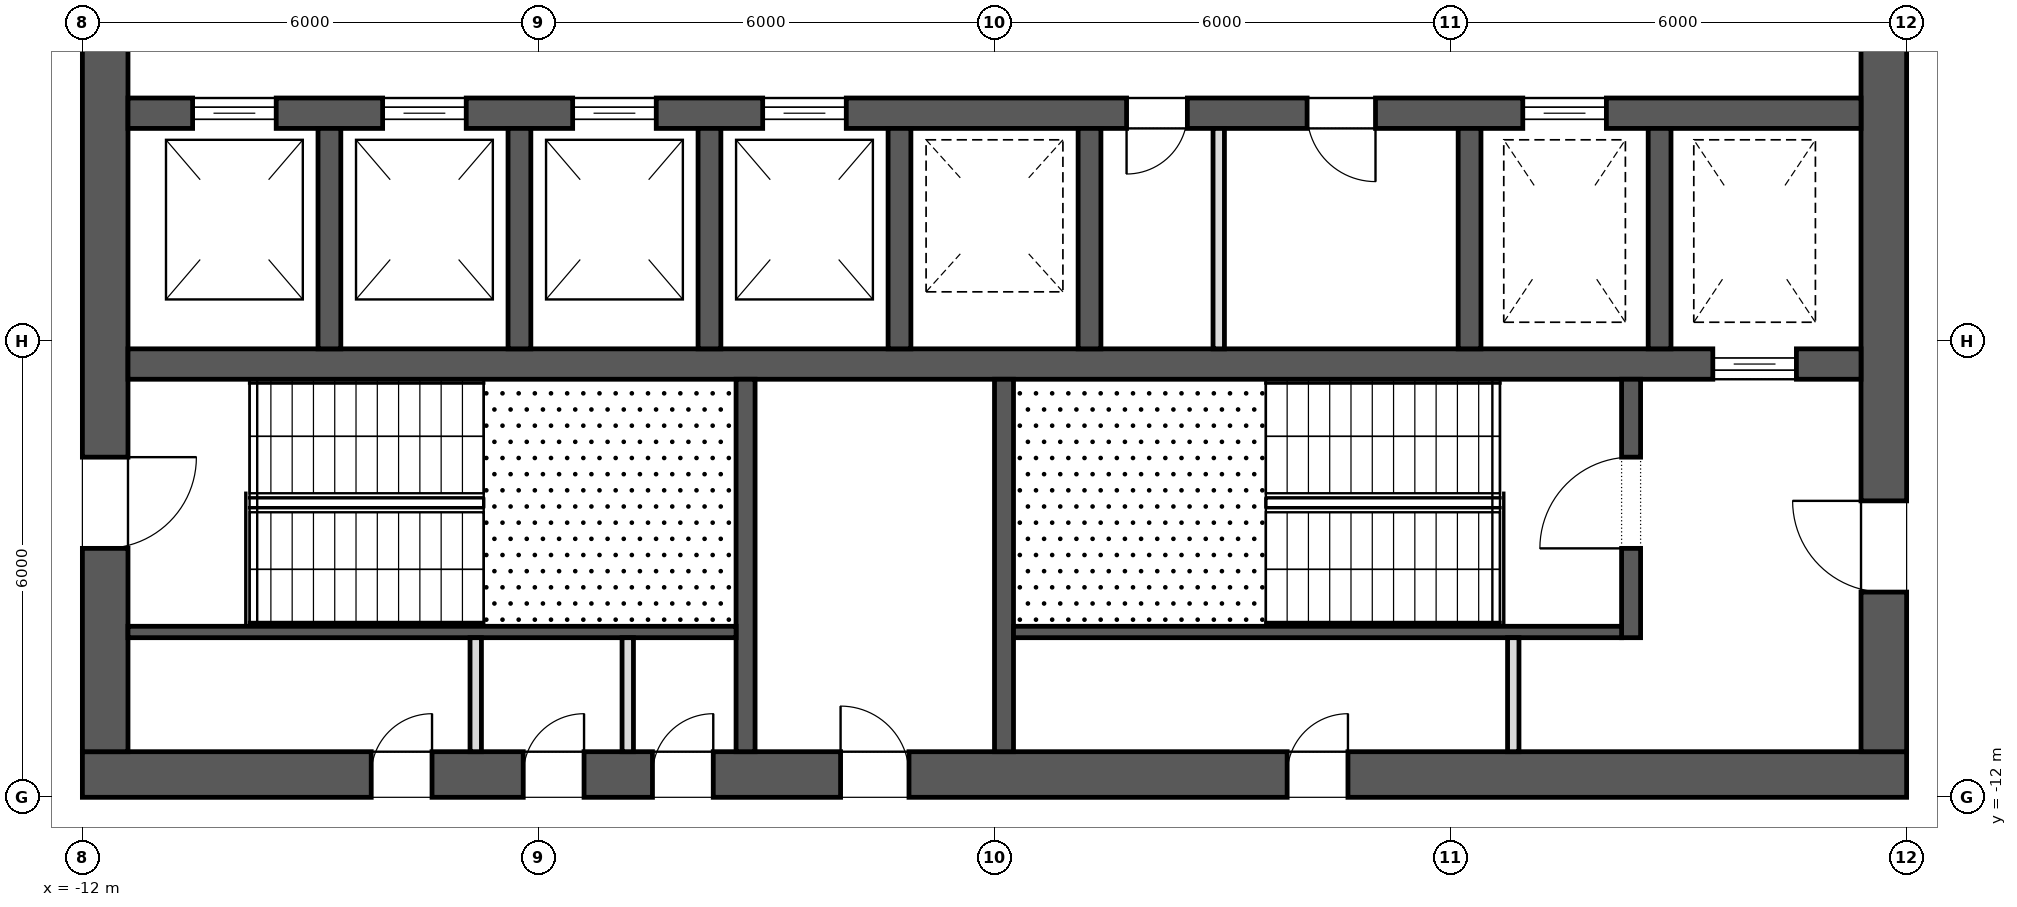
"""IFC4 building model, lengths in metres.
Left out: names, types, materials, properties, quantities, classifications, styles, units other than length and angle.
Written with IfcOpenShell. Run it as: python <this file> out.ifc"""

import sys

from ifc_helpers import new_model, si_unit, direction, frame, frame_2d, origin, place, context, subcontext, project, spatial, rectangle, extrude, element, fill, save


model = new_model("IFC4")
c1 = context("Model", 3, precision=1e-05, world=origin(), true_north=direction((0.0, 1.0)))
c2 = subcontext(c1, "Body", "Model", "MODEL_VIEW")
j1 = project(units=[si_unit("LENGTHUNIT", "METRE"), si_unit("PLANEANGLEUNIT", "RADIAN")], contexts=[c1])
p1 = place(None, origin())
s1 = spatial("IfcSite", under=j1, at=p1, CompositionType="ELEMENT")
p2 = place(p1, origin())
s2 = spatial("IfcBuilding", under=s1, at=p2, CompositionType="ELEMENT")
p3 = place(p2, frame((0.0, 0.0, 210.9)))
s3 = spatial("IfcBuildingStorey", under=s2, at=p3, CompositionType="ELEMENT", Elevation=210.9)
p4 = place(p3, frame((-12.0, -11.7, 0.0), z_axis=(0.0, 0.0, 1.0), x_axis=(1.0, 0.0, 0.0)))
e1 = element("IfcWall", 1, at=p4, inside=s3, PredefinedType="SHEAR", context=c2, shape_type="SweptSolid", body=[
    extrude(rectangle(XDim=24.0, YDim=0.6, at=frame_2d((12.0, 0.0))), origin(), (0.0, 0.0, 1.0), 4.0),
])
p5 = place(p4, frame((9.975, 0.0, 0.0)))
e2 = element("IfcOpeningElement", 2, at=p5, cuts=e1, PredefinedType="OPENING", context=c2, shape_type="SweptSolid", body=[
    extrude(rectangle(XDim=0.9, YDim=2.1, at=frame_2d((0.45, 1.05))), frame((0.0, 0.312, 0.0), z_axis=(0.0, -1.0, 0.0), x_axis=(1.0, 0.0, 0.0)), (0.0, 0.0, 1.0), 0.624),
])
p6 = place(p4, frame((3.8, 0.0, 0.0)))
e3 = element("IfcOpeningElement", 3, at=p6, cuts=e1, PredefinedType="OPENING", context=c2, shape_type="SweptSolid", body=[
    extrude(rectangle(XDim=0.8, YDim=2.1, at=frame_2d((0.4, 1.05))), frame((0.0, 0.312, 0.0), z_axis=(0.0, -1.0, 0.0), x_axis=(1.0, 0.0, 0.0)), (0.0, 0.0, 1.0), 0.624),
])
p7 = place(p4, frame((5.8, 0.0, 0.0)))
e4 = element("IfcOpeningElement", 4, at=p7, cuts=e1, PredefinedType="OPENING", context=c2, shape_type="SweptSolid", body=[
    extrude(rectangle(XDim=0.8, YDim=2.1, at=frame_2d((0.4, 1.05))), frame((0.0, 0.312, 0.0), z_axis=(0.0, -1.0, 0.0), x_axis=(1.0, 0.0, 0.0)), (0.0, 0.0, 1.0), 0.624),
])
p8 = place(p4, frame((7.5, 0.0, 0.0)))
e5 = element("IfcOpeningElement", 5, at=p8, cuts=e1, PredefinedType="OPENING", context=c2, shape_type="SweptSolid", body=[
    extrude(rectangle(XDim=0.8, YDim=2.1, at=frame_2d((0.4, 1.05))), frame((0.0, 0.312, 0.0), z_axis=(0.0, -1.0, 0.0), x_axis=(1.0, 0.0, 0.0)), (0.0, 0.0, 1.0), 0.624),
])
p9 = place(p4, frame((15.85, 0.0, 0.0)))
e6 = element("IfcOpeningElement", 6, at=p9, cuts=e1, PredefinedType="OPENING", context=c2, shape_type="SweptSolid", body=[
    extrude(rectangle(XDim=0.8, YDim=2.1, at=frame_2d((0.4, 1.05))), frame((0.0, 0.312, 0.0), z_axis=(0.0, -1.0, 0.0), x_axis=(1.0, 0.0, 0.0)), (0.0, 0.0, 1.0), 0.624),
])
p10 = place(p3, frame((11.7, -11.4, 0.0), z_axis=(0.0, 0.0, 1.0), x_axis=(0.0, 1.0, 0.0)))
e7 = element("IfcWall", 7, at=p10, inside=s3, PredefinedType="SHEAR", context=c2, shape_type="SweptSolid", body=[
    extrude(rectangle(XDim=22.8, YDim=0.6, at=frame_2d((11.4, 0.0))), origin(), (0.0, 0.0, 1.0), 4.0),
])
p11 = place(p10, frame((10.2, 0.0, 0.0)))
e8 = element("IfcOpeningElement", 8, at=p11, cuts=e7, PredefinedType="OPENING", context=c2, shape_type="SweptSolid", body=[
    extrude(rectangle(XDim=2.4, YDim=2.1, at=frame_2d((1.2, 1.05))), frame((0.0, 0.312, 0.0), z_axis=(0.0, -1.0, 0.0), x_axis=(1.0, 0.0, 0.0)), (0.0, 0.0, 1.0), 0.624),
])
p12 = place(p10, frame((19.5, 0.0, 0.0)))
e9 = element("IfcOpeningElement", 9, at=p12, cuts=e7, PredefinedType="OPENING", context=c2, shape_type="SweptSolid", body=[
    extrude(rectangle(XDim=1.2, YDim=2.1, at=frame_2d((0.6, 1.05))), frame((0.0, 0.312, 0.0), z_axis=(0.0, -1.0, 0.0), x_axis=(1.0, 0.0, 0.0)), (0.0, 0.0, 1.0), 0.624),
])
p13 = place(p10, frame((2.1, 0.0, 0.0)))
e10 = element("IfcOpeningElement", 10, at=p13, cuts=e7, PredefinedType="OPENING", context=c2, shape_type="SweptSolid", body=[
    extrude(rectangle(XDim=1.2, YDim=2.1, at=frame_2d((0.6, 1.05))), frame((0.0, 0.312, 0.0), z_axis=(0.0, -1.0, 0.0), x_axis=(1.0, 0.0, 0.0)), (0.0, 0.0, 1.0), 0.624),
])
p14 = place(p3, frame((-11.7, -11.4, 0.0), z_axis=(0.0, 0.0, 1.0), x_axis=(0.0, 1.0, 0.0)))
e11 = element("IfcWall", 11, at=p14, inside=s3, PredefinedType="SHEAR", context=c2, shape_type="SweptSolid", body=[
    extrude(rectangle(XDim=22.8, YDim=0.6, at=frame_2d((11.4, 0.0))), origin(), (0.0, 0.0, 1.0), 4.0),
])
p15 = place(p14, frame((10.2, 0.0, 0.0)))
e12 = element("IfcOpeningElement", 12, at=p15, cuts=e11, PredefinedType="OPENING", context=c2, shape_type="SweptSolid", body=[
    extrude(rectangle(XDim=2.4, YDim=2.1, at=frame_2d((1.2, 1.05))), frame((0.0, 0.312, 0.0), z_axis=(0.0, -1.0, 0.0), x_axis=(1.0, 0.0, 0.0)), (0.0, 0.0, 1.0), 0.624),
])
p16 = place(p14, frame((18.925, 0.0, 0.0)))
e13 = element("IfcOpeningElement", 13, at=p16, cuts=e11, PredefinedType="OPENING", context=c2, shape_type="SweptSolid", body=[
    extrude(rectangle(XDim=1.2, YDim=2.1, at=frame_2d((0.6, 1.05))), frame((0.0, 0.312, 0.0), z_axis=(0.0, -1.0, 0.0), x_axis=(1.0, 0.0, 0.0)), (0.0, 0.0, 1.0), 0.624),
])
p17 = place(p14, frame((2.675, 0.0, 0.0)))
e14 = element("IfcOpeningElement", 14, at=p17, cuts=e11, PredefinedType="OPENING", context=c2, shape_type="SweptSolid", body=[
    extrude(rectangle(XDim=1.2, YDim=2.1, at=frame_2d((0.6, 1.05))), frame((0.0, 0.312, 0.0), z_axis=(0.0, -1.0, 0.0), x_axis=(1.0, 0.0, 0.0)), (0.0, 0.0, 1.0), 0.624),
])
p18 = place(p3, frame((-11.4, -3.0, 0.0), z_axis=(0.0, 0.0, 1.0), x_axis=(1.0, 0.0, 0.0)))
e15 = element("IfcWall", 15, at=p18, inside=s3, PredefinedType="SHEAR", context=c2, shape_type="SweptSolid", body=[
    extrude(rectangle(XDim=22.8, YDim=0.4, at=frame_2d((11.4, 0.0))), origin(), (0.0, 0.0, 1.0), 4.0),
])
p19 = place(p18, frame((0.85, 0.0, 0.0)))
e16 = element("IfcOpeningElement", 16, at=p19, cuts=e15, PredefinedType="OPENING", context=c2, shape_type="SweptSolid", body=[
    extrude(rectangle(XDim=1.1, YDim=2.1, at=frame_2d((0.55, 1.05))), frame((0.0, 0.212, 0.0), z_axis=(0.0, -1.0, 0.0), x_axis=(1.0, 0.0, 0.0)), (0.0, 0.0, 1.0), 0.424),
])
p20 = place(p18, frame((3.35, 0.0, 0.0)))
e17 = element("IfcOpeningElement", 17, at=p20, cuts=e15, PredefinedType="OPENING", context=c2, shape_type="SweptSolid", body=[
    extrude(rectangle(XDim=1.1, YDim=2.1, at=frame_2d((0.55, 1.05))), frame((0.0, 0.212, 0.0), z_axis=(0.0, -1.0, 0.0), x_axis=(1.0, 0.0, 0.0)), (0.0, 0.0, 1.0), 0.424),
])
p21 = place(p18, frame((5.85, 0.0, 0.0)))
e18 = element("IfcOpeningElement", 18, at=p21, cuts=e15, PredefinedType="OPENING", context=c2, shape_type="SweptSolid", body=[
    extrude(rectangle(XDim=1.1, YDim=2.1, at=frame_2d((0.55, 1.05))), frame((0.0, 0.212, 0.0), z_axis=(0.0, -1.0, 0.0), x_axis=(1.0, 0.0, 0.0)), (0.0, 0.0, 1.0), 0.424),
])
p22 = place(p18, frame((8.35, 0.0, 0.0)))
e19 = element("IfcOpeningElement", 19, at=p22, cuts=e15, PredefinedType="OPENING", context=c2, shape_type="SweptSolid", body=[
    extrude(rectangle(XDim=1.1, YDim=2.1, at=frame_2d((0.55, 1.05))), frame((0.0, 0.212, 0.0), z_axis=(0.0, -1.0, 0.0), x_axis=(1.0, 0.0, 0.0)), (0.0, 0.0, 1.0), 0.424),
])
p23 = place(p18, frame((18.35, 0.0, 0.0)))
e20 = element("IfcOpeningElement", 20, at=p23, cuts=e15, PredefinedType="OPENING", context=c2, shape_type="SweptSolid", body=[
    extrude(rectangle(XDim=1.1, YDim=2.1, at=frame_2d((0.55, 1.05))), frame((0.0, 0.212, 0.0), z_axis=(0.0, -1.0, 0.0), x_axis=(1.0, 0.0, 0.0)), (0.0, 0.0, 1.0), 0.424),
])
p24 = place(p18, frame((13.137, 0.0, 0.0)))
e21 = element("IfcOpeningElement", 21, at=p24, cuts=e15, PredefinedType="OPENING", context=c2, shape_type="SweptSolid", body=[
    extrude(rectangle(XDim=0.8, YDim=2.1, at=frame_2d((0.4, 1.05))), frame((0.0, 0.212, 0.0), z_axis=(0.0, -1.0, 0.0), x_axis=(1.0, 0.0, 0.0)), (0.0, 0.0, 1.0), 0.424),
])
p25 = place(p18, frame((15.512, 0.0, 0.0)))
e22 = element("IfcOpeningElement", 22, at=p25, cuts=e15, PredefinedType="OPENING", context=c2, shape_type="SweptSolid", body=[
    extrude(rectangle(XDim=0.9, YDim=2.1, at=frame_2d((0.45, 1.05))), frame((0.0, 0.212, 0.0), z_axis=(0.0, -1.0, 0.0), x_axis=(1.0, 0.0, 0.0)), (0.0, 0.0, 1.0), 0.424),
])
p26 = place(p3, frame((-11.4, -6.3, 0.0), z_axis=(0.0, 0.0, 1.0), x_axis=(1.0, 0.0, 0.0)))
e23 = element("IfcWall", 23, at=p26, inside=s3, PredefinedType="SHEAR", context=c2, shape_type="SweptSolid", body=[
    extrude(rectangle(XDim=22.8, YDim=0.4, at=frame_2d((11.4, 0.0))), origin(), (0.0, 0.0, 1.0), 4.0),
])
p27 = place(p26, frame((20.85, 0.0, 0.0)))
e24 = element("IfcOpeningElement", 24, at=p27, cuts=e23, PredefinedType="OPENING", context=c2, shape_type="SweptSolid", body=[
    extrude(rectangle(XDim=1.1, YDim=2.1, at=frame_2d((0.55, 1.05))), frame((0.0, 0.212, 0.0), z_axis=(0.0, -1.0, 0.0), x_axis=(1.0, 0.0, 0.0)), (0.0, 0.0, 1.0), 0.424),
])
for number, where, z_axis, x_axis in (
    (25, (-8.75, -6.1, 0.0), (0.0, 0.0, 1.0), (0.0, 1.0, 0.0)),
    (26, (-6.25, -6.1, 0.0), (0.0, 0.0, 1.0), (0.0, 1.0, 0.0)),
    (27, (-3.75, -6.1, 0.0), (0.0, 0.0, 1.0), (0.0, 1.0, 0.0)),
    (28, (-1.25, -6.1, 0.0), (0.0, 0.0, 1.0), (0.0, 1.0, 0.0)),
    (29, (1.25, -6.1, 0.0), (0.0, 0.0, 1.0), (0.0, 1.0, 0.0)),
    (30, (6.25, -6.1, 0.0), (0.0, 0.0, 1.0), (0.0, 1.0, 0.0)),
    (31, (8.75, -6.1, 0.0), (0.0, 0.0, 1.0), (0.0, 1.0, 0.0)),
):
    element("IfcWall", number, at=place(p3, frame(where, z_axis=z_axis, x_axis=x_axis)), inside=s3, PredefinedType="SHEAR", context=c2, shape_type="SweptSolid", body=[
        extrude(rectangle(XDim=2.9, YDim=0.3, at=frame_2d((1.45, 0.0))), origin(), (0.0, 0.0, 1.0), 4.0),
    ])
for number, where, z_axis, x_axis in (
    (32, (-3.275, -11.4, 0.0), (0.0, 0.0, 1.0), (0.0, 1.0, 0.0)),
    (33, (0.125, -11.4, 0.0), (0.0, 0.0, 1.0), (0.0, 1.0, 0.0)),
):
    element("IfcWall", number, at=place(p3, frame(where, z_axis=z_axis, x_axis=x_axis)), inside=s3, PredefinedType="SHEAR", context=c2, shape_type="SweptSolid", body=[
        extrude(rectangle(XDim=4.9, YDim=0.25, at=frame_2d((2.45, 0.0))), origin(), (0.0, 0.0, 1.0), 3.7),
    ])
p28 = place(p3, frame((8.375, -9.9, 0.0), z_axis=(0.0, 0.0, 1.0), x_axis=(0.0, 1.0, 0.0)))
e34 = element("IfcWall", 34, at=p28, inside=s3, PredefinedType="SHEAR", context=c2, shape_type="SweptSolid", body=[
    extrude(rectangle(XDim=3.4, YDim=0.25, at=frame_2d((1.7, 0.0))), origin(), (0.0, 0.0, 1.0), 3.7),
])
p29 = place(p28, frame((1.175, 0.0, 0.0)))
e35 = element("IfcOpeningElement", 35, at=p29, cuts=e34, PredefinedType="OPENING", context=c2, shape_type="SweptSolid", body=[
    extrude(rectangle(XDim=1.2, YDim=2.1, at=frame_2d((0.6, 1.05))), frame((0.0, 0.137, 0.0), z_axis=(0.0, -1.0, 0.0), x_axis=(1.0, 0.0, 0.0)), (0.0, 0.0, 1.0), 0.274),
])
for number, where, z_axis, x_axis in (
    (36, (-11.4, -9.825, 0.0), (0.0, 0.0, 1.0), (1.0, 0.0, 0.0)),
    (37, (0.25, -9.825, 0.0), (0.0, 0.0, 1.0), (1.0, 0.0, 0.0)),
):
    element("IfcWall", number, at=place(p3, frame(where, z_axis=z_axis, x_axis=x_axis)), inside=s3, PredefinedType="SHEAR", context=c2, shape_type="SweptSolid", body=[
        extrude(rectangle(XDim=8.0, YDim=0.15, at=frame_2d((4.0, 0.0))), origin(), (0.0, 0.0, 1.0), 3.7),
    ])
for number, where, z_axis, x_axis in (
    (38, (-6.825, -11.4, 0.0), (0.0, 0.0, 1.0), (0.0, 1.0, 0.0)),
    (39, (-4.825, -11.4, 0.0), (0.0, 0.0, 1.0), (0.0, 1.0, 0.0)),
    (40, (6.825, -11.4, 0.0), (0.0, 0.0, 1.0), (0.0, 1.0, 0.0)),
):
    element("IfcWall", number, at=place(p3, frame(where, z_axis=z_axis, x_axis=x_axis)), inside=s3, PredefinedType="PARTITIONING", context=c2, shape_type="SweptSolid", body=[
        extrude(rectangle(XDim=1.5, YDim=0.15, at=frame_2d((0.75, 0.0))), origin(), (0.0, 0.0, 1.0), 3.7),
    ])
p30 = place(p3, frame((2.95, -6.1, 0.0), z_axis=(0.0, 0.0, 1.0), x_axis=(0.0, 1.0, 0.0)))
e41 = element("IfcWall", 41, at=p30, inside=s3, PredefinedType="PARTITIONING", context=c2, shape_type="SweptSolid", body=[
    extrude(rectangle(XDim=2.9, YDim=0.15, at=frame_2d((1.45, 0.0))), origin(), (0.0, 0.0, 1.0), 3.7),
])
p31 = place(p27, origin())
e42 = element("IfcDoor", 42, at=p31, inside=s3, OperationType="SLIDING_TO_LEFT", PredefinedType="DOOR", context=c2, shape_type="SweptSolid", body=[
    extrude(rectangle(XDim=1.1, YDim=2.1, at=frame_2d((0.55, 1.05))), frame((0.0, 0.025, 0.0), z_axis=(0.0, -1.0, 0.0), x_axis=(1.0, 0.0, 0.0)), (0.0, 0.0, 1.0), 0.05),
])
fill(e24, e42)
p32 = place(p19, origin())
e43 = element("IfcDoor", 43, at=p32, inside=s3, OperationType="SLIDING_TO_LEFT", PredefinedType="DOOR", context=c2, shape_type="SweptSolid", body=[
    extrude(rectangle(XDim=1.1, YDim=2.1, at=frame_2d((0.55, 1.05))), frame((0.0, 0.025, 0.0), z_axis=(0.0, -1.0, 0.0), x_axis=(1.0, 0.0, 0.0)), (0.0, 0.0, 1.0), 0.05),
])
fill(e16, e43)
p33 = place(p20, origin())
e44 = element("IfcDoor", 44, at=p33, inside=s3, OperationType="SLIDING_TO_LEFT", PredefinedType="DOOR", context=c2, shape_type="SweptSolid", body=[
    extrude(rectangle(XDim=1.1, YDim=2.1, at=frame_2d((0.55, 1.05))), frame((0.0, 0.025, 0.0), z_axis=(0.0, -1.0, 0.0), x_axis=(1.0, 0.0, 0.0)), (0.0, 0.0, 1.0), 0.05),
])
fill(e17, e44)
p34 = place(p21, origin())
e45 = element("IfcDoor", 45, at=p34, inside=s3, OperationType="SLIDING_TO_LEFT", PredefinedType="DOOR", context=c2, shape_type="SweptSolid", body=[
    extrude(rectangle(XDim=1.1, YDim=2.1, at=frame_2d((0.55, 1.05))), frame((0.0, 0.025, 0.0), z_axis=(0.0, -1.0, 0.0), x_axis=(1.0, 0.0, 0.0)), (0.0, 0.0, 1.0), 0.05),
])
fill(e18, e45)
p35 = place(p22, origin())
e46 = element("IfcDoor", 46, at=p35, inside=s3, OperationType="SLIDING_TO_LEFT", PredefinedType="DOOR", context=c2, shape_type="SweptSolid", body=[
    extrude(rectangle(XDim=1.1, YDim=2.1, at=frame_2d((0.55, 1.05))), frame((0.0, 0.025, 0.0), z_axis=(0.0, -1.0, 0.0), x_axis=(1.0, 0.0, 0.0)), (0.0, 0.0, 1.0), 0.05),
])
fill(e19, e46)
p36 = place(p23, origin())
e47 = element("IfcDoor", 47, at=p36, inside=s3, OperationType="SLIDING_TO_LEFT", PredefinedType="DOOR", context=c2, shape_type="SweptSolid", body=[
    extrude(rectangle(XDim=1.1, YDim=2.1, at=frame_2d((0.55, 1.05))), frame((0.0, 0.025, 0.0), z_axis=(0.0, -1.0, 0.0), x_axis=(1.0, 0.0, 0.0)), (0.0, 0.0, 1.0), 0.05),
])
fill(e20, e47)
p37 = place(p17, frame((1.2, 0.0, 0.0), z_axis=(0.0, 0.0, 1.0), x_axis=(-1.0, 0.0, 0.0)))
e48 = element("IfcDoor", 48, at=p37, inside=s3, OperationType="SINGLE_SWING_RIGHT", PredefinedType="DOOR", context=c2, shape_type="SweptSolid", body=[
    extrude(rectangle(XDim=1.2, YDim=2.1, at=frame_2d((0.6, 1.05))), frame((0.0, 0.025, 0.0), z_axis=(0.0, -1.0, 0.0), x_axis=(1.0, 0.0, 0.0)), (0.0, 0.0, 1.0), 0.05),
])
fill(e14, e48)
p38 = place(p29, origin())
e49 = element("IfcDoor", 49, at=p38, inside=s3, OperationType="SINGLE_SWING_RIGHT", PredefinedType="DOOR", context=c2, shape_type="SweptSolid", body=[
    extrude(rectangle(XDim=1.2, YDim=2.1, at=frame_2d((0.6, 1.05))), frame((0.0, 0.025, 0.0), z_axis=(0.0, -1.0, 0.0), x_axis=(1.0, 0.0, 0.0)), (0.0, 0.0, 1.0), 0.05),
])
fill(e35, e49)
p39 = place(p13, origin())
e50 = element("IfcDoor", 50, at=p39, inside=s3, OperationType="SINGLE_SWING_LEFT", PredefinedType="DOOR", context=c2, shape_type="SweptSolid", body=[
    extrude(rectangle(XDim=1.2, YDim=2.1, at=frame_2d((0.6, 1.05))), frame((0.0, 0.025, 0.0), z_axis=(0.0, -1.0, 0.0), x_axis=(1.0, 0.0, 0.0)), (0.0, 0.0, 1.0), 0.05),
])
fill(e10, e50)
p40 = place(p5, origin())
e51 = element("IfcDoor", 51, at=p40, inside=s3, OperationType="SINGLE_SWING_RIGHT", PredefinedType="DOOR", context=c2, shape_type="SweptSolid", body=[
    extrude(rectangle(XDim=0.9, YDim=2.1, at=frame_2d((0.45, 1.05))), frame((0.0, 0.025, 0.0), z_axis=(0.0, -1.0, 0.0), x_axis=(1.0, 0.0, 0.0)), (0.0, 0.0, 1.0), 0.05),
])
fill(e2, e51)
p41 = place(p6, origin())
e52 = element("IfcDoor", 52, at=p41, inside=s3, OperationType="SINGLE_SWING_LEFT", PredefinedType="DOOR", context=c2, shape_type="SweptSolid", body=[
    extrude(rectangle(XDim=0.8, YDim=2.1, at=frame_2d((0.4, 1.05))), frame((0.0, 0.025, 0.0), z_axis=(0.0, -1.0, 0.0), x_axis=(1.0, 0.0, 0.0)), (0.0, 0.0, 1.0), 0.05),
])
fill(e3, e52)
p42 = place(p7, origin())
e53 = element("IfcDoor", 53, at=p42, inside=s3, OperationType="SINGLE_SWING_LEFT", PredefinedType="DOOR", context=c2, shape_type="SweptSolid", body=[
    extrude(rectangle(XDim=0.8, YDim=2.1, at=frame_2d((0.4, 1.05))), frame((0.0, 0.025, 0.0), z_axis=(0.0, -1.0, 0.0), x_axis=(1.0, 0.0, 0.0)), (0.0, 0.0, 1.0), 0.05),
])
fill(e4, e53)
p43 = place(p8, origin())
e54 = element("IfcDoor", 54, at=p43, inside=s3, OperationType="SINGLE_SWING_LEFT", PredefinedType="DOOR", context=c2, shape_type="SweptSolid", body=[
    extrude(rectangle(XDim=0.8, YDim=2.1, at=frame_2d((0.4, 1.05))), frame((0.0, 0.025, 0.0), z_axis=(0.0, -1.0, 0.0), x_axis=(1.0, 0.0, 0.0)), (0.0, 0.0, 1.0), 0.05),
])
fill(e5, e54)
p44 = place(p9, origin())
e55 = element("IfcDoor", 55, at=p44, inside=s3, OperationType="SINGLE_SWING_LEFT", PredefinedType="DOOR", context=c2, shape_type="SweptSolid", body=[
    extrude(rectangle(XDim=0.8, YDim=2.1, at=frame_2d((0.4, 1.05))), frame((0.0, 0.025, 0.0), z_axis=(0.0, -1.0, 0.0), x_axis=(1.0, 0.0, 0.0)), (0.0, 0.0, 1.0), 0.05),
])
fill(e6, e55)
p45 = place(p24, frame((0.8, 0.0, 0.0), z_axis=(0.0, 0.0, 1.0), x_axis=(-1.0, 0.0, 0.0)))
e56 = element("IfcDoor", 56, at=p45, inside=s3, OperationType="SINGLE_SWING_LEFT", PredefinedType="DOOR", context=c2, shape_type="SweptSolid", body=[
    extrude(rectangle(XDim=0.8, YDim=2.1, at=frame_2d((0.4, 1.05))), frame((0.0, 0.025, 0.0), z_axis=(0.0, -1.0, 0.0), x_axis=(1.0, 0.0, 0.0)), (0.0, 0.0, 1.0), 0.05),
])
fill(e21, e56)
p46 = place(p25, frame((0.9, 0.0, 0.0), z_axis=(0.0, 0.0, 1.0), x_axis=(-1.0, 0.0, 0.0)))
e57 = element("IfcDoor", 57, at=p46, inside=s3, OperationType="SINGLE_SWING_RIGHT", PredefinedType="DOOR", context=c2, shape_type="SweptSolid", body=[
    extrude(rectangle(XDim=0.9, YDim=2.1, at=frame_2d((0.45, 1.05))), frame((0.0, 0.025, 0.0), z_axis=(0.0, -1.0, 0.0), x_axis=(1.0, 0.0, 0.0)), (0.0, 0.0, 1.0), 0.05),
])
fill(e22, e57)
save(model, sys.argv[1])
